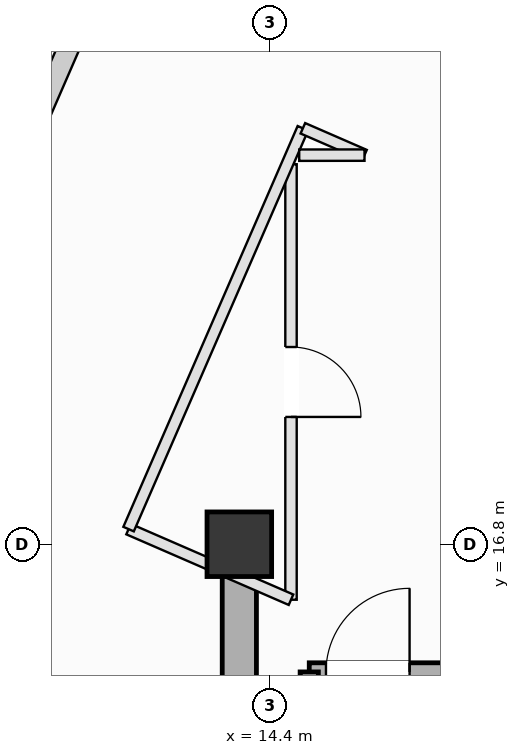
"""IFC4 building model, lengths in metres.
Left out: names, types, materials, properties, quantities, classifications, styles, units other than length and angle.
Written with IfcOpenShell. Run it as: python <this file> out.ifc"""

import sys

from ifc_helpers import new_model, si_unit, direction, frame, frame_2d, origin, origin_2d, place, context, subcontext, project, spatial, rectangle, extrude, element, fill, save


model = new_model("IFC4")
c1 = context("Model", 3, precision=1e-05, world=origin(), true_north=direction((0.0, 1.0)))
c2 = subcontext(c1, "Body", "Model", "MODEL_VIEW")
j1 = project(units=[si_unit("LENGTHUNIT", "METRE"), si_unit("PLANEANGLEUNIT", "RADIAN")], contexts=[c1])
p1 = place(None, origin())
s1 = spatial("IfcSite", under=j1, at=p1, CompositionType="ELEMENT")
p2 = place(p1, origin())
s2 = spatial("IfcBuilding", under=s1, at=p2, CompositionType="ELEMENT")
p3 = place(p2, frame((0.0, 0.0, 342.6)))
s3 = spatial("IfcBuildingStorey", under=s2, at=p3, CompositionType="ELEMENT", Elevation=342.6)
p4 = place(p3, frame((14.0, 16.8, 0.0), z_axis=(0.0, 0.0, 1.0), x_axis=(1.0, 0.0, 0.0)))
e1 = element("IfcColumn", 1, at=p4, inside=s3, PredefinedType="COLUMN", context=c2, shape_type="SweptSolid", body=[
    extrude(rectangle(XDim=0.85, YDim=0.85, at=origin_2d()), origin(), (0.0, 0.0, 1.0), 5.2),
])
p5 = place(p3, frame((9.283, 17.653, 0.0), z_axis=(0.0, 0.0, 1.0), x_axis=(0.398746796056, 0.917061062653, 0.0)))
e2 = element("IfcWall", 2, at=p5, inside=s3, PredefinedType="SOLIDWALL", context=c2, shape_type="SweptSolid", body=[
    extrude(rectangle(XDim=8.2, YDim=0.28, at=frame_2d((4.1, 0.0))), origin(), (0.0, 0.0, 1.0), 4.335),
])
p6 = place(p3, frame((14.92, 15.12, 0.0), z_axis=(0.0, 0.0, 1.0), x_axis=(1.0, 0.0, 0.0)))
e3 = element("IfcWall", 3, at=p6, inside=s3, PredefinedType="SOLIDWALL", context=c2, shape_type="SweptSolid", body=[
    extrude(rectangle(XDim=3.46, YDim=0.24, at=frame_2d((1.73, 0.0))), origin(), (0.0, 0.0, 1.0), 4.85),
])
p7 = place(p6, frame((0.22, 0.0, 0.0)))
e4 = element("IfcOpeningElement", 4, at=p7, cuts=e3, PredefinedType="OPENING", context=c2, shape_type="SweptSolid", body=[
    extrude(rectangle(XDim=1.1, YDim=2.15, at=frame_2d((0.55, 1.075))), frame((0.0, 0.13, 0.0), z_axis=(0.0, -1.0, 0.0), x_axis=(1.0, 0.0, 0.0)), (0.0, 0.0, 1.0), 0.26),
])
p8 = place(p3, frame((14.92, 8.025, 0.0), z_axis=(0.0, 0.0, 1.0), x_axis=(0.0, 1.0, 0.0)))
e5 = element("IfcWall", 5, at=p8, inside=s3, PredefinedType="SOLIDWALL", context=c2, shape_type="SweptSolid", body=[
    extrude(rectangle(XDim=7.095, YDim=0.24, at=frame_2d((3.548, 0.0))), origin(), (0.0, 0.0, 1.0), 4.85),
])
p9 = place(p3, frame((14.0, 16.8, 0.0), z_axis=(0.0, 0.0, 1.0), x_axis=(0.0, -1.0, 0.0)))
e6 = element("IfcWall", 6, at=p9, inside=s3, PredefinedType="SHEAR", context=c2, shape_type="SweptSolid", body=[
    extrude(rectangle(XDim=9.0, YDim=0.45, at=frame_2d((4.5, 0.0))), origin(), (0.0, 0.0, 1.0), 4.85),
])
p10 = place(p3, frame((8.432, 15.406, 0.0), z_axis=(0.0, 0.0, 1.0), x_axis=(0.917075309006, -0.398714029865, 0.0)))
e7 = element("IfcWall", 7, at=p10, inside=s3, PredefinedType="PARTITIONING", context=c2, shape_type="SweptSolid", body=[
    extrude(rectangle(XDim=5.911, YDim=0.15, at=frame_2d((2.956, 0.0))), origin(), (0.0, 0.0, 1.0), 4.85),
])
p11 = place(p3, frame((14.68, 21.8, 0.0), z_axis=(0.0, 0.0, 1.0), x_axis=(0.0, -1.0, 0.0)))
e8 = element("IfcWall", 8, at=p11, inside=s3, PredefinedType="PARTITIONING", context=c2, shape_type="SweptSolid", body=[
    extrude(rectangle(XDim=5.73, YDim=0.15, at=frame_2d((2.865, 0.0))), origin(), (0.0, 0.0, 1.0), 4.85),
])
p12 = place(p11, frame((2.405, 0.0, 0.0)))
e9 = element("IfcOpeningElement", 9, at=p12, cuts=e8, PredefinedType="OPENING", context=c2, shape_type="SweptSolid", body=[
    extrude(rectangle(XDim=0.92, YDim=2.1, at=frame_2d((0.46, 1.05))), frame((0.0, 0.085, 0.0), z_axis=(0.0, -1.0, 0.0), x_axis=(1.0, 0.0, 0.0)), (0.0, 0.0, 1.0), 0.17),
])
p13 = place(p3, frame((14.68, 16.07, 0.0), z_axis=(0.0, 0.0, 1.0), x_axis=(-0.917095040527, 0.39866864266, 0.0)))
e10 = element("IfcWall", 10, at=p13, inside=s3, PredefinedType="PARTITIONING", context=c2, shape_type="SweptSolid", body=[
    extrude(rectangle(XDim=2.33, YDim=0.15, at=frame_2d((1.165, 0.0))), origin(), (0.0, 0.0, 1.0), 3.835),
])
p14 = place(p3, frame((12.543, 16.999, 0.0), z_axis=(0.0, 0.0, 1.0), x_axis=(0.398719902043, 0.917072755955, 0.0)))
e11 = element("IfcWall", 11, at=p14, inside=s3, PredefinedType="PARTITIONING", context=c2, shape_type="SweptSolid", body=[
    extrude(rectangle(XDim=5.751, YDim=0.15, at=frame_2d((2.875, 0.0))), origin(), (0.0, 0.0, 1.0), 4.85),
])
p15 = place(p3, frame((14.836, 22.273, 0.0), z_axis=(0.0, 0.0, 1.0), x_axis=(0.916903229522, -0.399109593585, 0.0)))
e12 = element("IfcWall", 12, at=p15, inside=s3, PredefinedType="PARTITIONING", context=c2, shape_type="SweptSolid", body=[
    extrude(rectangle(XDim=0.885, YDim=0.15, at=frame_2d((0.442, 0.0))), origin(), (0.0, 0.0, 1.0), 4.85),
])
p16 = place(p3, frame((15.647, 21.92, 0.0), z_axis=(0.0, 0.0, 1.0), x_axis=(-0.999999353605, -0.00113700893, 0.0)))
e13 = element("IfcWall", 13, at=p16, inside=s3, PredefinedType="PARTITIONING", context=c2, shape_type="SweptSolid", body=[
    extrude(rectangle(XDim=0.859, YDim=0.15, at=frame_2d((0.429, 0.0))), origin(), (0.0, 0.0, 1.0), 4.85),
])
p17 = place(p7, origin())
e14 = element("IfcDoor", 14, at=p17, inside=s3, OperationType="SINGLE_SWING_RIGHT", PredefinedType="DOOR", context=c2, shape_type="SweptSolid", body=[
    extrude(rectangle(XDim=1.1, YDim=2.15, at=frame_2d((0.55, 1.075))), frame((0.0, 0.025, 0.0), z_axis=(0.0, -1.0, 0.0), x_axis=(1.0, 0.0, 0.0)), (0.0, 0.0, 1.0), 0.05),
])
fill(e4, e14)
p18 = place(p12, origin())
e15 = element("IfcDoor", 15, at=p18, inside=s3, OperationType="SINGLE_SWING_RIGHT", PredefinedType="DOOR", context=c2, shape_type="SweptSolid", body=[
    extrude(rectangle(XDim=0.92, YDim=2.1, at=frame_2d((0.46, 1.05))), frame((0.0, 0.025, 0.0), z_axis=(0.0, -1.0, 0.0), x_axis=(1.0, 0.0, 0.0)), (0.0, 0.0, 1.0), 0.05),
])
fill(e9, e15)
save(model, sys.argv[1])
